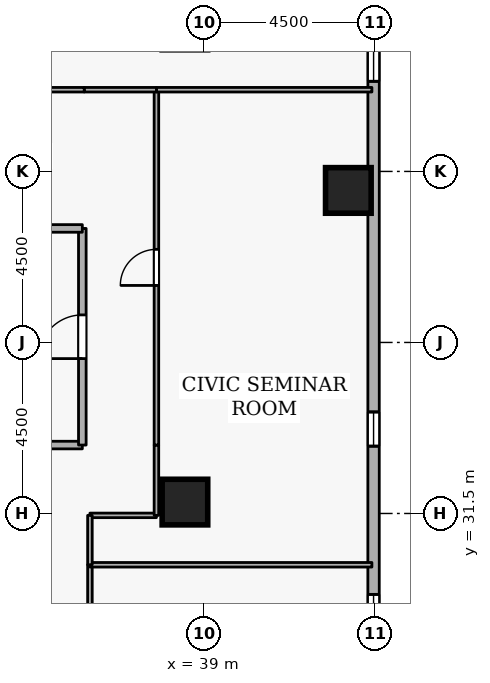
"""IFC4 building model, lengths in metres.
Left out: names, types, materials, properties, quantities, classifications, styles, units other than length and angle.
Written with IfcOpenShell. Run it as: python <this file> out.ifc"""

import sys

from ifc_helpers import new_model, si_unit, direction, frame, frame_2d, origin, origin_2d, place, context, subcontext, project, spatial, rectangle, extrude, element, fill, save


model = new_model("IFC4")
c1 = context("Model", 3, precision=1e-05, world=origin(), true_north=direction((0.0, 1.0)))
c2 = subcontext(c1, "Body", "Model", "MODEL_VIEW")
j1 = project(units=[si_unit("LENGTHUNIT", "METRE"), si_unit("PLANEANGLEUNIT", "RADIAN")], contexts=[c1])
p1 = place(None, origin())
s1 = spatial("IfcSite", under=j1, at=p1, CompositionType="ELEMENT")
p2 = place(p1, origin())
s2 = spatial("IfcBuilding", under=s1, at=p2, CompositionType="ELEMENT")
p3 = place(p2, frame((0.0, 0.0, 108.9)))
s3 = spatial("IfcBuildingStorey", under=s2, at=p3, CompositionType="ELEMENT", Elevation=108.9)
for number, where, z_axis, x_axis in (
    (1, (42.8, 40.0, 0.0), (0.0, 0.0, 1.0), (1.0, 0.0, 0.0)),
    (2, (38.5, 31.8, 0.0), (0.0, 0.0, 1.0), (1.0, 0.0, 0.0)),
):
    element("IfcColumn", number, at=place(p3, frame(where, z_axis=z_axis, x_axis=x_axis)), inside=s3, PredefinedType="COLUMN", context=c2, shape_type="SweptSolid", body=[
        extrude(rectangle(XDim=1.2, YDim=1.2, at=origin_2d()), origin(), (0.0, 0.0, 1.0), 3.6),
    ])
p4 = place(p3, frame((43.463, 12.271, 0.0), z_axis=(0.0, 0.0, 1.0), x_axis=(5.4088042e-05, 0.999999998537, 0.0)))
e3 = element("IfcWall", 3, at=p4, inside=s3, PredefinedType="STANDARD", context=c2, shape_type="SweptSolid", body=[
    extrude(rectangle(XDim=36.11, YDim=0.3, at=frame_2d((18.055, 0.0))), origin(), (0.0, 0.0, 1.0), 2.7),
])
p5 = place(p4, frame((6.6, 0.0, 0.72)))
e4 = element("IfcOpeningElement", 4, at=p5, cuts=e3, PredefinedType="OPENING", context=c2, shape_type="SweptSolid", body=[
    extrude(rectangle(XDim=0.9, YDim=1.75, at=frame_2d((0.45, 0.875))), frame((0.0, 0.16, 0.0), z_axis=(0.0, -1.0, 0.0), x_axis=(1.0, 0.0, 0.0)), (0.0, 0.0, 1.0), 0.32),
])
p6 = place(p4, frame((11.4, 0.0, 0.72)))
e5 = element("IfcOpeningElement", 5, at=p6, cuts=e3, PredefinedType="OPENING", context=c2, shape_type="SweptSolid", body=[
    extrude(rectangle(XDim=0.9, YDim=1.75, at=frame_2d((0.45, 0.875))), frame((0.0, 0.16, 0.0), z_axis=(0.0, -1.0, 0.0), x_axis=(1.0, 0.0, 0.0)), (0.0, 0.0, 1.0), 0.32),
])
p7 = place(p4, frame((16.2, 0.0, 0.72)))
e6 = element("IfcOpeningElement", 6, at=p7, cuts=e3, PredefinedType="OPENING", context=c2, shape_type="SweptSolid", body=[
    extrude(rectangle(XDim=0.9, YDim=1.75, at=frame_2d((0.45, 0.875))), frame((0.0, 0.16, 0.0), z_axis=(0.0, -1.0, 0.0), x_axis=(1.0, 0.0, 0.0)), (0.0, 0.0, 1.0), 0.32),
])
p8 = place(p4, frame((21.0, 0.0, 0.72)))
e7 = element("IfcOpeningElement", 7, at=p8, cuts=e3, PredefinedType="OPENING", context=c2, shape_type="SweptSolid", body=[
    extrude(rectangle(XDim=0.9, YDim=1.75, at=frame_2d((0.45, 0.875))), frame((0.0, 0.16, 0.0), z_axis=(0.0, -1.0, 0.0), x_axis=(1.0, 0.0, 0.0)), (0.0, 0.0, 1.0), 0.32),
])
p9 = place(p4, frame((30.6, 0.0, 0.72)))
e8 = element("IfcOpeningElement", 8, at=p9, cuts=e3, PredefinedType="OPENING", context=c2, shape_type="SweptSolid", body=[
    extrude(rectangle(XDim=0.9, YDim=1.75, at=frame_2d((0.45, 0.875))), frame((0.0, 0.16, 0.0), z_axis=(0.0, -1.0, 0.0), x_axis=(1.0, 0.0, 0.0)), (0.0, 0.0, 1.0), 0.32),
])
p10 = place(p3, frame((33.3, 33.3, 0.0), z_axis=(0.0, 0.0, 1.0), x_axis=(1.0, 0.0, 0.0)))
e9 = element("IfcWall", 9, at=p10, inside=s3, PredefinedType="STANDARD", context=c2, shape_type="SweptSolid", body=[
    extrude(rectangle(XDim=2.5, YDim=0.2, at=frame_2d((1.25, 0.0))), origin(), (0.0, 0.0, 1.0), 3.34),
])
p11 = place(p3, frame((35.8, 33.3, 0.0), z_axis=(0.0, 0.0, 1.0), x_axis=(0.0, 1.0, 0.0)))
e10 = element("IfcWall", 10, at=p11, inside=s3, PredefinedType="STANDARD", context=c2, shape_type="SweptSolid", body=[
    extrude(rectangle(XDim=5.7, YDim=0.2, at=frame_2d((2.85, 0.0))), origin(), (0.0, 0.0, 1.0), 3.34),
])
p12 = place(p11, frame((2.275, 0.0, 0.0)))
e11 = element("IfcOpeningElement", 11, at=p12, cuts=e10, PredefinedType="OPENING", context=c2, shape_type="SweptSolid", body=[
    extrude(rectangle(XDim=1.15, YDim=2.1, at=frame_2d((0.575, 1.05))), frame((0.0, 0.11, 0.0), z_axis=(0.0, -1.0, 0.0), x_axis=(1.0, 0.0, 0.0)), (0.0, 0.0, 1.0), 0.22),
])
p13 = place(p3, frame((35.8, 39.0, 0.0), z_axis=(0.0, 0.0, 1.0), x_axis=(-1.0, 0.0, 0.0)))
e12 = element("IfcWall", 12, at=p13, inside=s3, PredefinedType="STANDARD", context=c2, shape_type="SweptSolid", body=[
    extrude(rectangle(XDim=2.5, YDim=0.2, at=frame_2d((1.25, 0.0))), origin(), (0.0, 0.0, 1.0), 3.34),
])
p14 = place(p3, frame((36.0, 27.0, 0.0), z_axis=(0.0, 0.0, 1.0), x_axis=(0.0, 1.0, 0.0)))
e13 = element("IfcWall", 13, at=p14, inside=s3, PredefinedType="PARTITIONING", context=c2, shape_type="SweptSolid", body=[
    extrude(rectangle(XDim=3.15, YDim=0.12, at=frame_2d((1.575, 0.0))), origin(), (0.0, 0.0, 1.0), 3.34),
])
p15 = place(p14, frame((1.1, 0.0, 0.0)))
e14 = element("IfcOpeningElement", 14, at=p15, cuts=e13, PredefinedType="OPENING", context=c2, shape_type="SweptSolid", body=[
    extrude(rectangle(XDim=0.95, YDim=2.1, at=frame_2d((0.475, 1.05))), frame((0.0, 0.07, 0.0), z_axis=(0.0, -1.0, 0.0), x_axis=(1.0, 0.0, 0.0)), (0.0, 0.0, 1.0), 0.14),
])
p16 = place(p3, frame((36.0, 30.15, 0.0), z_axis=(0.0, 0.0, 1.0), x_axis=(1.0, 0.0, 0.0)))
e15 = element("IfcWall", 15, at=p16, inside=s3, PredefinedType="PARTITIONING", context=c2, shape_type="SweptSolid", body=[
    extrude(rectangle(XDim=7.42, YDim=0.12, at=frame_2d((3.71, 0.0))), origin(), (0.0, 0.0, 1.0), 3.34),
])
p17 = place(p3, frame((36.0, 31.45, 0.0), z_axis=(0.0, 0.0, 1.0), x_axis=(1.0, 0.0, 0.0)))
e16 = element("IfcWall", 16, at=p17, inside=s3, PredefinedType="PARTITIONING", context=c2, shape_type="SweptSolid", body=[
    extrude(rectangle(XDim=1.75, YDim=0.12, at=frame_2d((0.875, 0.0))), origin(), (0.0, 0.0, 1.0), 3.34),
])
p18 = place(p3, frame((37.75, 31.45, 0.0), z_axis=(0.0, 0.0, 1.0), x_axis=(0.0, 1.0, 0.0)))
e17 = element("IfcWall", 17, at=p18, inside=s3, PredefinedType="PARTITIONING", context=c2, shape_type="SweptSolid", body=[
    extrude(rectangle(XDim=1.85, YDim=0.12, at=frame_2d((0.925, 0.0))), origin(), (0.0, 0.0, 1.0), 3.34),
])
p19 = place(p3, frame((37.75, 33.3, 0.0), z_axis=(0.0, 0.0, 1.0), x_axis=(0.0, 1.0, 0.0)))
e18 = element("IfcWall", 18, at=p19, inside=s3, PredefinedType="PARTITIONING", context=c2, shape_type="SweptSolid", body=[
    extrude(rectangle(XDim=9.35, YDim=0.12, at=frame_2d((4.675, 0.0))), origin(), (0.0, 0.0, 1.0), 3.34),
])
p20 = place(p19, frame((4.2, 0.0, 0.0)))
e19 = element("IfcOpeningElement", 19, at=p20, cuts=e18, PredefinedType="OPENING", context=c2, shape_type="SweptSolid", body=[
    extrude(rectangle(XDim=0.95, YDim=2.1, at=frame_2d((0.475, 1.05))), frame((0.0, 0.07, 0.0), z_axis=(0.0, -1.0, 0.0), x_axis=(1.0, 0.0, 0.0)), (0.0, 0.0, 1.0), 0.14),
])
p21 = place(p3, frame((37.75, 42.65, 0.0), z_axis=(0.0, 0.0, 1.0), x_axis=(1.0, 0.0, 0.0)))
e20 = element("IfcWall", 20, at=p21, inside=s3, PredefinedType="PARTITIONING", context=c2, shape_type="SweptSolid", body=[
    extrude(rectangle(XDim=5.67, YDim=0.12, at=frame_2d((2.835, 0.0))), origin(), (0.0, 0.0, 1.0), 3.34),
])
p22 = place(p3, frame((36.0, 30.15, 0.0), z_axis=(0.0, 0.0, 1.0), x_axis=(0.0, 1.0, 0.0)))
e21 = element("IfcWall", 21, at=p22, inside=s3, PredefinedType="PARTITIONING", context=c2, shape_type="SweptSolid", body=[
    extrude(rectangle(XDim=1.3, YDim=0.12, at=frame_2d((0.65, 0.0))), origin(), (0.0, 0.0, 1.0), 3.34),
])
p23 = place(p3, frame((37.75, 42.65, 0.0), z_axis=(0.0, 0.0, 1.0), x_axis=(-1.0, 0.0, 0.0)))
e22 = element("IfcWall", 22, at=p23, inside=s3, PredefinedType="PARTITIONING", context=c2, shape_type="SweptSolid", body=[
    extrude(rectangle(XDim=1.9, YDim=0.12, at=frame_2d((0.95, 0.0))), origin(), (0.0, 0.0, 1.0), 3.34),
])
p24 = place(p3, frame((35.85, 42.65, 0.0), z_axis=(0.0, 0.0, 1.0), x_axis=(-1.0, 0.0, 0.0)))
e23 = element("IfcWall", 23, at=p24, inside=s3, PredefinedType="PARTITIONING", context=c2, shape_type="SweptSolid", body=[
    extrude(rectangle(XDim=4.85, YDim=0.12, at=frame_2d((2.425, 0.0))), origin(), (0.0, 0.0, 1.0), 2.895),
])
p25 = place(p24, frame((1.9, 0.0, 0.0)))
e24 = element("IfcOpeningElement", 24, at=p25, cuts=e23, PredefinedType="OPENING", context=c2, shape_type="SweptSolid", body=[
    extrude(rectangle(XDim=1.05, YDim=2.1, at=frame_2d((0.525, 1.05))), frame((0.0, 0.07, 0.0), z_axis=(0.0, -1.0, 0.0), x_axis=(1.0, 0.0, 0.0)), (0.0, 0.0, 1.0), 0.14),
])
p26 = place(p7, origin())
e25 = element("IfcWindow", 25, at=p26, inside=s3, PartitioningType="SINGLE_PANEL", PredefinedType="WINDOW", context=c2, shape_type="SweptSolid", body=[
    extrude(rectangle(XDim=0.9, YDim=1.75, at=frame_2d((0.45, 0.875))), frame((0.0, 0.03, 0.0), z_axis=(0.0, -1.0, 0.0), x_axis=(1.0, 0.0, 0.0)), (0.0, 0.0, 1.0), 0.06),
])
fill(e6, e25)
p27 = place(p8, origin())
e26 = element("IfcWindow", 26, at=p27, inside=s3, PartitioningType="SINGLE_PANEL", PredefinedType="WINDOW", context=c2, shape_type="SweptSolid", body=[
    extrude(rectangle(XDim=0.9, YDim=1.75, at=frame_2d((0.45, 0.875))), frame((0.0, 0.03, 0.0), z_axis=(0.0, -1.0, 0.0), x_axis=(1.0, 0.0, 0.0)), (0.0, 0.0, 1.0), 0.06),
])
fill(e7, e26)
p28 = place(p9, origin())
e27 = element("IfcWindow", 27, at=p28, inside=s3, PartitioningType="SINGLE_PANEL", PredefinedType="WINDOW", context=c2, shape_type="SweptSolid", body=[
    extrude(rectangle(XDim=0.9, YDim=1.75, at=frame_2d((0.45, 0.875))), frame((0.0, 0.03, 0.0), z_axis=(0.0, -1.0, 0.0), x_axis=(1.0, 0.0, 0.0)), (0.0, 0.0, 1.0), 0.06),
])
fill(e8, e27)
p29 = place(p12, origin())
e28 = element("IfcDoor", 28, at=p29, inside=s3, OperationType="SINGLE_SWING_LEFT", PredefinedType="DOOR", context=c2, shape_type="SweptSolid", body=[
    extrude(rectangle(XDim=1.15, YDim=2.1, at=frame_2d((0.575, 1.05))), frame((0.0, 0.025, 0.0), z_axis=(0.0, -1.0, 0.0), x_axis=(1.0, 0.0, 0.0)), (0.0, 0.0, 1.0), 0.05),
])
fill(e11, e28)
p30 = place(p20, origin())
e29 = element("IfcDoor", 29, at=p30, inside=s3, OperationType="SINGLE_SWING_LEFT", PredefinedType="DOOR", context=c2, shape_type="SweptSolid", body=[
    extrude(rectangle(XDim=0.95, YDim=2.1, at=frame_2d((0.475, 1.05))), frame((0.0, 0.025, 0.0), z_axis=(0.0, -1.0, 0.0), x_axis=(1.0, 0.0, 0.0)), (0.0, 0.0, 1.0), 0.05),
])
fill(e19, e29)
save(model, sys.argv[1])
